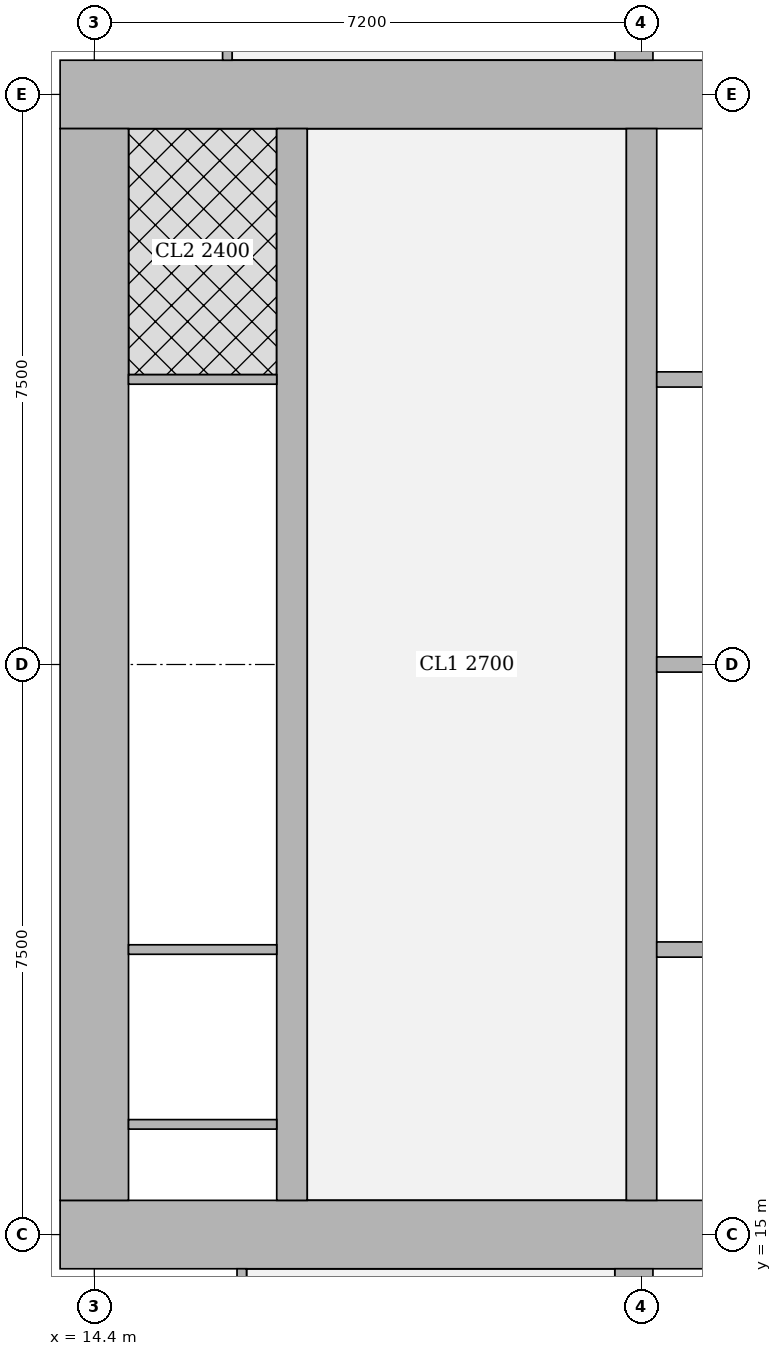
"""IFC4 building model, lengths in metres.
Left out: names, types, materials, properties, quantities, classifications, styles, units other than length and angle.
Written with IfcOpenShell. Run it as: python <this file> out.ifc"""

import sys

from ifc_helpers import new_model, si_unit, direction, frame, frame_2d, origin, place, context, subcontext, project, spatial, rectangle, extrude, element, fill, save


model = new_model("IFC4")
c1 = context("Model", 3, precision=1e-05, world=origin(), true_north=direction((0.0, 1.0)))
c2 = subcontext(c1, "Body", "Model", "MODEL_VIEW")
j1 = project(units=[si_unit("LENGTHUNIT", "METRE"), si_unit("PLANEANGLEUNIT", "RADIAN")], contexts=[c1])
p1 = place(None, origin())
s1 = spatial("IfcSite", under=j1, at=p1, CompositionType="ELEMENT")
p2 = place(p1, origin())
s2 = spatial("IfcBuilding", under=s1, at=p2, CompositionType="ELEMENT")
p3 = place(p2, frame((0.0, 0.0, 223.7)))
s3 = spatial("IfcBuildingStorey", under=s2, at=p3, CompositionType="ELEMENT", Elevation=223.7)
p4 = place(p3, frame((13.95, 15.0, 0.0), z_axis=(0.0, 0.0, 1.0), x_axis=(1.0, 0.0, 0.0)))
e1 = element("IfcWall", 1, at=p4, inside=s3, PredefinedType="SHEAR", context=c2, shape_type="SweptSolid", body=[
    extrude(rectangle(XDim=15.3, YDim=0.9, at=frame_2d((7.65, 0.0))), origin(), (0.0, 0.0, 1.0), 3.75),
])
p5 = place(p4, frame((4.45, 0.0, 0.0)))
e2 = element("IfcOpeningElement", 2, at=p5, cuts=e1, PredefinedType="OPENING", context=c2, shape_type="SweptSolid", body=[
    extrude(rectangle(XDim=1.8, YDim=2.1, at=frame_2d((0.9, 1.05))), frame((0.0, 0.46, 0.0), z_axis=(0.0, -1.0, 0.0), x_axis=(1.0, 0.0, 0.0)), (0.0, 0.0, 1.0), 0.92),
])
p6 = place(p4, frame((10.7, 0.0, 0.0)))
e3 = element("IfcOpeningElement", 3, at=p6, cuts=e1, PredefinedType="OPENING", context=c2, shape_type="SweptSolid", body=[
    extrude(rectangle(XDim=1.1, YDim=2.1, at=frame_2d((0.55, 1.05))), frame((0.0, 0.46, 0.0), z_axis=(0.0, -1.0, 0.0), x_axis=(1.0, 0.0, 0.0)), (0.0, 0.0, 1.0), 0.92),
])
p7 = place(p3, frame((13.95, 30.0, 0.0), z_axis=(0.0, 0.0, 1.0), x_axis=(1.0, 0.0, 0.0)))
e4 = element("IfcWall", 4, at=p7, inside=s3, PredefinedType="SHEAR", context=c2, shape_type="SweptSolid", body=[
    extrude(rectangle(XDim=15.3, YDim=0.9, at=frame_2d((7.65, 0.0))), origin(), (0.0, 0.0, 1.0), 3.75),
])
p8 = place(p7, frame((4.45, 0.0, 0.0)))
e5 = element("IfcOpeningElement", 5, at=p8, cuts=e4, PredefinedType="OPENING", context=c2, shape_type="SweptSolid", body=[
    extrude(rectangle(XDim=1.8, YDim=2.1, at=frame_2d((0.9, 1.05))), frame((0.0, 0.46, 0.0), z_axis=(0.0, -1.0, 0.0), x_axis=(1.0, 0.0, 0.0)), (0.0, 0.0, 1.0), 0.92),
])
p9 = place(p7, frame((10.7, 0.0, 0.0)))
e6 = element("IfcOpeningElement", 6, at=p9, cuts=e4, PredefinedType="OPENING", context=c2, shape_type="SweptSolid", body=[
    extrude(rectangle(XDim=1.1, YDim=2.1, at=frame_2d((0.55, 1.05))), frame((0.0, 0.46, 0.0), z_axis=(0.0, -1.0, 0.0), x_axis=(1.0, 0.0, 0.0)), (0.0, 0.0, 1.0), 0.92),
])
p10 = place(p3, frame((14.4, 15.45, 0.0), z_axis=(0.0, 0.0, 1.0), x_axis=(0.0, 1.0, 0.0)))
e7 = element("IfcWall", 7, at=p10, inside=s3, PredefinedType="SHEAR", context=c2, shape_type="SweptSolid", body=[
    extrude(rectangle(XDim=14.1, YDim=0.9, at=frame_2d((7.05, 0.0))), origin(), (0.0, 0.0, 1.0), 3.75),
])
p11 = place(p3, frame((17.0, 15.45, 0.0), z_axis=(0.0, 0.0, 1.0), x_axis=(0.0, 1.0, 0.0)))
e8 = element("IfcWall", 8, at=p11, inside=s3, PredefinedType="SHEAR", context=c2, shape_type="SweptSolid", body=[
    extrude(rectangle(XDim=14.1, YDim=0.4, at=frame_2d((7.05, 0.0))), origin(), (0.0, 0.0, 1.0), 3.75),
])
p12 = place(p11, frame((1.05, 0.0, 0.0)))
e9 = element("IfcOpeningElement", 9, at=p12, cuts=e8, PredefinedType="OPENING", context=c2, shape_type="SweptSolid", body=[
    extrude(rectangle(XDim=1.0, YDim=2.1, at=frame_2d((0.5, 1.05))), frame((0.0, 0.21, 0.0), z_axis=(0.0, -1.0, 0.0), x_axis=(1.0, 0.0, 0.0)), (0.0, 0.0, 1.0), 0.42),
])
p13 = place(p11, frame((4.675, 0.0, 0.0)))
e10 = element("IfcOpeningElement", 10, at=p13, cuts=e8, PredefinedType="OPENING", context=c2, shape_type="SweptSolid", body=[
    extrude(rectangle(XDim=1.0, YDim=2.1, at=frame_2d((0.5, 1.05))), frame((0.0, 0.21, 0.0), z_axis=(0.0, -1.0, 0.0), x_axis=(1.0, 0.0, 0.0)), (0.0, 0.0, 1.0), 0.42),
])
p14 = place(p11, frame((8.425, 0.0, 0.0)))
e11 = element("IfcOpeningElement", 11, at=p14, cuts=e8, PredefinedType="OPENING", context=c2, shape_type="SweptSolid", body=[
    extrude(rectangle(XDim=1.0, YDim=2.1, at=frame_2d((0.5, 1.05))), frame((0.0, 0.21, 0.0), z_axis=(0.0, -1.0, 0.0), x_axis=(1.0, 0.0, 0.0)), (0.0, 0.0, 1.0), 0.42),
])
p15 = place(p11, frame((12.175, 0.0, 0.0)))
e12 = element("IfcOpeningElement", 12, at=p15, cuts=e8, PredefinedType="OPENING", context=c2, shape_type="SweptSolid", body=[
    extrude(rectangle(XDim=1.0, YDim=2.1, at=frame_2d((0.5, 1.05))), frame((0.0, 0.21, 0.0), z_axis=(0.0, -1.0, 0.0), x_axis=(1.0, 0.0, 0.0)), (0.0, 0.0, 1.0), 0.42),
])
p16 = place(p3, frame((21.6, 15.45, 0.0), z_axis=(0.0, 0.0, 1.0), x_axis=(0.0, 1.0, 0.0)))
e13 = element("IfcWall", 13, at=p16, inside=s3, PredefinedType="SHEAR", context=c2, shape_type="SweptSolid", body=[
    extrude(rectangle(XDim=14.1, YDim=0.4, at=frame_2d((7.05, 0.0))), origin(), (0.0, 0.0, 1.0), 3.75),
])
p17 = place(p16, frame((0.875, 0.0, 0.0)))
e14 = element("IfcOpeningElement", 14, at=p17, cuts=e13, PredefinedType="OPENING", context=c2, shape_type="SweptSolid", body=[
    extrude(rectangle(XDim=1.1, YDim=2.1, at=frame_2d((0.55, 1.05))), frame((0.0, 0.21, 0.0), z_axis=(0.0, -1.0, 0.0), x_axis=(1.0, 0.0, 0.0)), (0.0, 0.0, 1.0), 0.42),
])
p18 = place(p16, frame((4.625, 0.0, 0.0)))
e15 = element("IfcOpeningElement", 15, at=p18, cuts=e13, PredefinedType="OPENING", context=c2, shape_type="SweptSolid", body=[
    extrude(rectangle(XDim=1.1, YDim=2.1, at=frame_2d((0.55, 1.05))), frame((0.0, 0.21, 0.0), z_axis=(0.0, -1.0, 0.0), x_axis=(1.0, 0.0, 0.0)), (0.0, 0.0, 1.0), 0.42),
])
p19 = place(p16, frame((8.375, 0.0, 0.0)))
e16 = element("IfcOpeningElement", 16, at=p19, cuts=e13, PredefinedType="OPENING", context=c2, shape_type="SweptSolid", body=[
    extrude(rectangle(XDim=1.1, YDim=2.1, at=frame_2d((0.55, 1.05))), frame((0.0, 0.21, 0.0), z_axis=(0.0, -1.0, 0.0), x_axis=(1.0, 0.0, 0.0)), (0.0, 0.0, 1.0), 0.42),
])
p20 = place(p16, frame((12.125, 0.0, 0.0)))
e17 = element("IfcOpeningElement", 17, at=p20, cuts=e13, PredefinedType="OPENING", context=c2, shape_type="SweptSolid", body=[
    extrude(rectangle(XDim=1.1, YDim=2.1, at=frame_2d((0.55, 1.05))), frame((0.0, 0.21, 0.0), z_axis=(0.0, -1.0, 0.0), x_axis=(1.0, 0.0, 0.0)), (0.0, 0.0, 1.0), 0.42),
])
for number, where, z_axis, x_axis in (
    (18, (21.5, 10.35, 0.0), (0.0, 0.0, 1.0), (0.0, 1.0, 0.0)),
    (19, (21.5, 30.45, 0.0), (0.0, 0.0, 1.0), (0.0, 1.0, 0.0)),
):
    element("IfcWall", number, at=place(p3, frame(where, z_axis=z_axis, x_axis=x_axis)), inside=s3, PredefinedType="SHEAR", context=c2, shape_type="SweptSolid", body=[
        extrude(rectangle(XDim=4.2, YDim=0.5, at=frame_2d((2.1, 0.0))), origin(), (0.0, 0.0, 1.0), 3.75),
    ])
p21 = place(p3, frame((16.34, 10.762, 0.0), z_axis=(0.0, 0.0, 1.0), x_axis=(0.0, 1.0, 0.0)))
e20 = element("IfcWall", 20, at=p21, inside=s3, PredefinedType="PARTITIONING", context=c2, shape_type="SweptSolid", body=[
    extrude(rectangle(XDim=3.788, YDim=0.125, at=frame_2d((1.894, 0.0))), origin(), (0.0, 0.0, 1.0), 3.5),
])
p22 = place(p21, frame((1.338, 0.0, 0.0)))
e21 = element("IfcOpeningElement", 21, at=p22, cuts=e20, PredefinedType="OPENING", context=c2, shape_type="SweptSolid", body=[
    extrude(rectangle(XDim=1.0, YDim=2.1, at=frame_2d((0.5, 1.05))), frame((0.0, 0.073, 0.0), z_axis=(0.0, -1.0, 0.0), x_axis=(1.0, 0.0, 0.0)), (0.0, 0.0, 1.0), 0.145),
])
p23 = place(p3, frame((16.15, 30.45, 0.0), z_axis=(0.0, 0.0, 1.0), x_axis=(0.0, 1.0, 0.0)))
e22 = element("IfcWall", 22, at=p23, inside=s3, PredefinedType="PARTITIONING", context=c2, shape_type="SweptSolid", body=[
    extrude(rectangle(XDim=4.137, YDim=0.125, at=frame_2d((2.068, 0.0))), origin(), (0.0, 0.0, 1.0), 3.5),
])
p24 = place(p23, frame((1.625, 0.0, 0.0)))
e23 = element("IfcOpeningElement", 23, at=p24, cuts=e22, PredefinedType="OPENING", context=c2, shape_type="SweptSolid", body=[
    extrude(rectangle(XDim=1.0, YDim=2.1, at=frame_2d((0.5, 1.05))), frame((0.0, 0.073, 0.0), z_axis=(0.0, -1.0, 0.0), x_axis=(1.0, 0.0, 0.0)), (0.0, 0.0, 1.0), 0.145),
])
p25 = place(p3, frame((14.85, 16.45, 0.0), z_axis=(0.0, 0.0, 1.0), x_axis=(1.0, 0.0, 0.0)))
e24 = element("IfcWall", 24, at=p25, inside=s3, PredefinedType="PARTITIONING", context=c2, shape_type="SweptSolid", body=[
    extrude(rectangle(XDim=1.95, YDim=0.125, at=frame_2d((0.975, 0.0))), origin(), (0.0, 0.0, 1.0), 3.5),
])
p26 = place(p25, frame((0.2, 0.0, 0.0)))
e25 = element("IfcOpeningElement", 25, at=p26, cuts=e24, PredefinedType="OPENING", context=c2, shape_type="SweptSolid", body=[
    extrude(rectangle(XDim=1.0, YDim=2.1, at=frame_2d((0.5, 1.05))), frame((0.0, 0.073, 0.0), z_axis=(0.0, -1.0, 0.0), x_axis=(1.0, 0.0, 0.0)), (0.0, 0.0, 1.0), 0.145),
])
for number, where, z_axis, x_axis in (
    (26, (14.85, 18.75, 0.0), (0.0, 0.0, 1.0), (1.0, 0.0, 0.0)),
    (27, (14.85, 26.25, 0.0), (0.0, 0.0, 1.0), (1.0, 0.0, 0.0)),
):
    element("IfcWall", number, at=place(p3, frame(where, z_axis=z_axis, x_axis=x_axis)), inside=s3, PredefinedType="PARTITIONING", context=c2, shape_type="SweptSolid", body=[
        extrude(rectangle(XDim=1.95, YDim=0.125, at=frame_2d((0.975, 0.0))), origin(), (0.0, 0.0, 1.0), 3.5),
    ])
for number, where, z_axis, x_axis in (
    (28, (21.8, 18.75, 0.0), (0.0, 0.0, 1.0), (1.0, 0.0, 0.0)),
    (29, (21.8, 22.5, 0.0), (0.0, 0.0, 1.0), (1.0, 0.0, 0.0)),
    (30, (21.8, 26.25, 0.0), (0.0, 0.0, 1.0), (1.0, 0.0, 0.0)),
):
    element("IfcWall", number, at=place(p3, frame(where, z_axis=z_axis, x_axis=x_axis)), inside=s3, PredefinedType="SOLIDWALL", context=c2, shape_type="SweptSolid", body=[
        extrude(rectangle(XDim=2.2, YDim=0.2, at=frame_2d((1.1, 0.0))), origin(), (0.0, 0.0, 1.0), 3.5),
    ])
p27 = place(p26, origin())
e31 = element("IfcDoor", 31, at=p27, inside=s3, OperationType="SINGLE_SWING_RIGHT", PredefinedType="DOOR", context=c2, shape_type="SweptSolid", body=[
    extrude(rectangle(XDim=1.0, YDim=2.1, at=frame_2d((0.5, 1.05))), frame((0.0, 0.025, 0.0), z_axis=(0.0, -1.0, 0.0), x_axis=(1.0, 0.0, 0.0)), (0.0, 0.0, 1.0), 0.05),
])
fill(e25, e31)
p28 = place(p12, origin())
e32 = element("IfcDoor", 32, at=p28, inside=s3, OperationType="SINGLE_SWING_LEFT", PredefinedType="DOOR", context=c2, shape_type="SweptSolid", body=[
    extrude(rectangle(XDim=1.0, YDim=2.1, at=frame_2d((0.5, 1.05))), frame((0.0, 0.025, 0.0), z_axis=(0.0, -1.0, 0.0), x_axis=(1.0, 0.0, 0.0)), (0.0, 0.0, 1.0), 0.05),
])
fill(e9, e32)
p29 = place(p13, origin())
e33 = element("IfcDoor", 33, at=p29, inside=s3, OperationType="SINGLE_SWING_LEFT", PredefinedType="DOOR", context=c2, shape_type="SweptSolid", body=[
    extrude(rectangle(XDim=1.0, YDim=2.1, at=frame_2d((0.5, 1.05))), frame((0.0, 0.025, 0.0), z_axis=(0.0, -1.0, 0.0), x_axis=(1.0, 0.0, 0.0)), (0.0, 0.0, 1.0), 0.05),
])
fill(e10, e33)
p30 = place(p14, origin())
e34 = element("IfcDoor", 34, at=p30, inside=s3, OperationType="SINGLE_SWING_RIGHT", PredefinedType="DOOR", context=c2, shape_type="SweptSolid", body=[
    extrude(rectangle(XDim=1.0, YDim=2.1, at=frame_2d((0.5, 1.05))), frame((0.0, 0.025, 0.0), z_axis=(0.0, -1.0, 0.0), x_axis=(1.0, 0.0, 0.0)), (0.0, 0.0, 1.0), 0.05),
])
fill(e11, e34)
p31 = place(p15, origin())
e35 = element("IfcDoor", 35, at=p31, inside=s3, OperationType="SINGLE_SWING_RIGHT", PredefinedType="DOOR", context=c2, shape_type="SweptSolid", body=[
    extrude(rectangle(XDim=1.0, YDim=2.1, at=frame_2d((0.5, 1.05))), frame((0.0, 0.025, 0.0), z_axis=(0.0, -1.0, 0.0), x_axis=(1.0, 0.0, 0.0)), (0.0, 0.0, 1.0), 0.05),
])
fill(e12, e35)
p32 = place(p5, origin())
e36 = element("IfcDoor", 36, at=p32, inside=s3, OperationType="DOUBLE_DOOR_SINGLE_SWING", PredefinedType="DOOR", context=c2, shape_type="SweptSolid", body=[
    extrude(rectangle(XDim=1.8, YDim=2.1, at=frame_2d((0.9, 1.05))), frame((0.0, 0.025, 0.0), z_axis=(0.0, -1.0, 0.0), x_axis=(1.0, 0.0, 0.0)), (0.0, 0.0, 1.0), 0.05),
])
fill(e2, e36)
p33 = place(p8, origin())
e37 = element("IfcDoor", 37, at=p33, inside=s3, OperationType="DOUBLE_DOOR_SINGLE_SWING", PredefinedType="DOOR", context=c2, shape_type="SweptSolid", body=[
    extrude(rectangle(XDim=1.8, YDim=2.1, at=frame_2d((0.9, 1.05))), frame((0.0, 0.025, 0.0), z_axis=(0.0, -1.0, 0.0), x_axis=(1.0, 0.0, 0.0)), (0.0, 0.0, 1.0), 0.05),
])
fill(e5, e37)
p34 = place(p17, origin())
e38 = element("IfcDoor", 38, at=p34, inside=s3, OperationType="DOUBLE_DOOR_SLIDING", PredefinedType="DOOR", context=c2, shape_type="SweptSolid", body=[
    extrude(rectangle(XDim=1.1, YDim=2.1, at=frame_2d((0.55, 1.05))), frame((0.0, 0.025, 0.0), z_axis=(0.0, -1.0, 0.0), x_axis=(1.0, 0.0, 0.0)), (0.0, 0.0, 1.0), 0.05),
])
fill(e14, e38)
p35 = place(p18, origin())
e39 = element("IfcDoor", 39, at=p35, inside=s3, OperationType="DOUBLE_DOOR_SLIDING", PredefinedType="DOOR", context=c2, shape_type="SweptSolid", body=[
    extrude(rectangle(XDim=1.1, YDim=2.1, at=frame_2d((0.55, 1.05))), frame((0.0, 0.025, 0.0), z_axis=(0.0, -1.0, 0.0), x_axis=(1.0, 0.0, 0.0)), (0.0, 0.0, 1.0), 0.05),
])
fill(e15, e39)
p36 = place(p19, origin())
e40 = element("IfcDoor", 40, at=p36, inside=s3, OperationType="DOUBLE_DOOR_SLIDING", PredefinedType="DOOR", context=c2, shape_type="SweptSolid", body=[
    extrude(rectangle(XDim=1.1, YDim=2.1, at=frame_2d((0.55, 1.05))), frame((0.0, 0.025, 0.0), z_axis=(0.0, -1.0, 0.0), x_axis=(1.0, 0.0, 0.0)), (0.0, 0.0, 1.0), 0.05),
])
fill(e16, e40)
p37 = place(p20, origin())
e41 = element("IfcDoor", 41, at=p37, inside=s3, OperationType="DOUBLE_DOOR_SLIDING", PredefinedType="DOOR", context=c2, shape_type="SweptSolid", body=[
    extrude(rectangle(XDim=1.1, YDim=2.1, at=frame_2d((0.55, 1.05))), frame((0.0, 0.025, 0.0), z_axis=(0.0, -1.0, 0.0), x_axis=(1.0, 0.0, 0.0)), (0.0, 0.0, 1.0), 0.05),
])
fill(e17, e41)
save(model, sys.argv[1])
